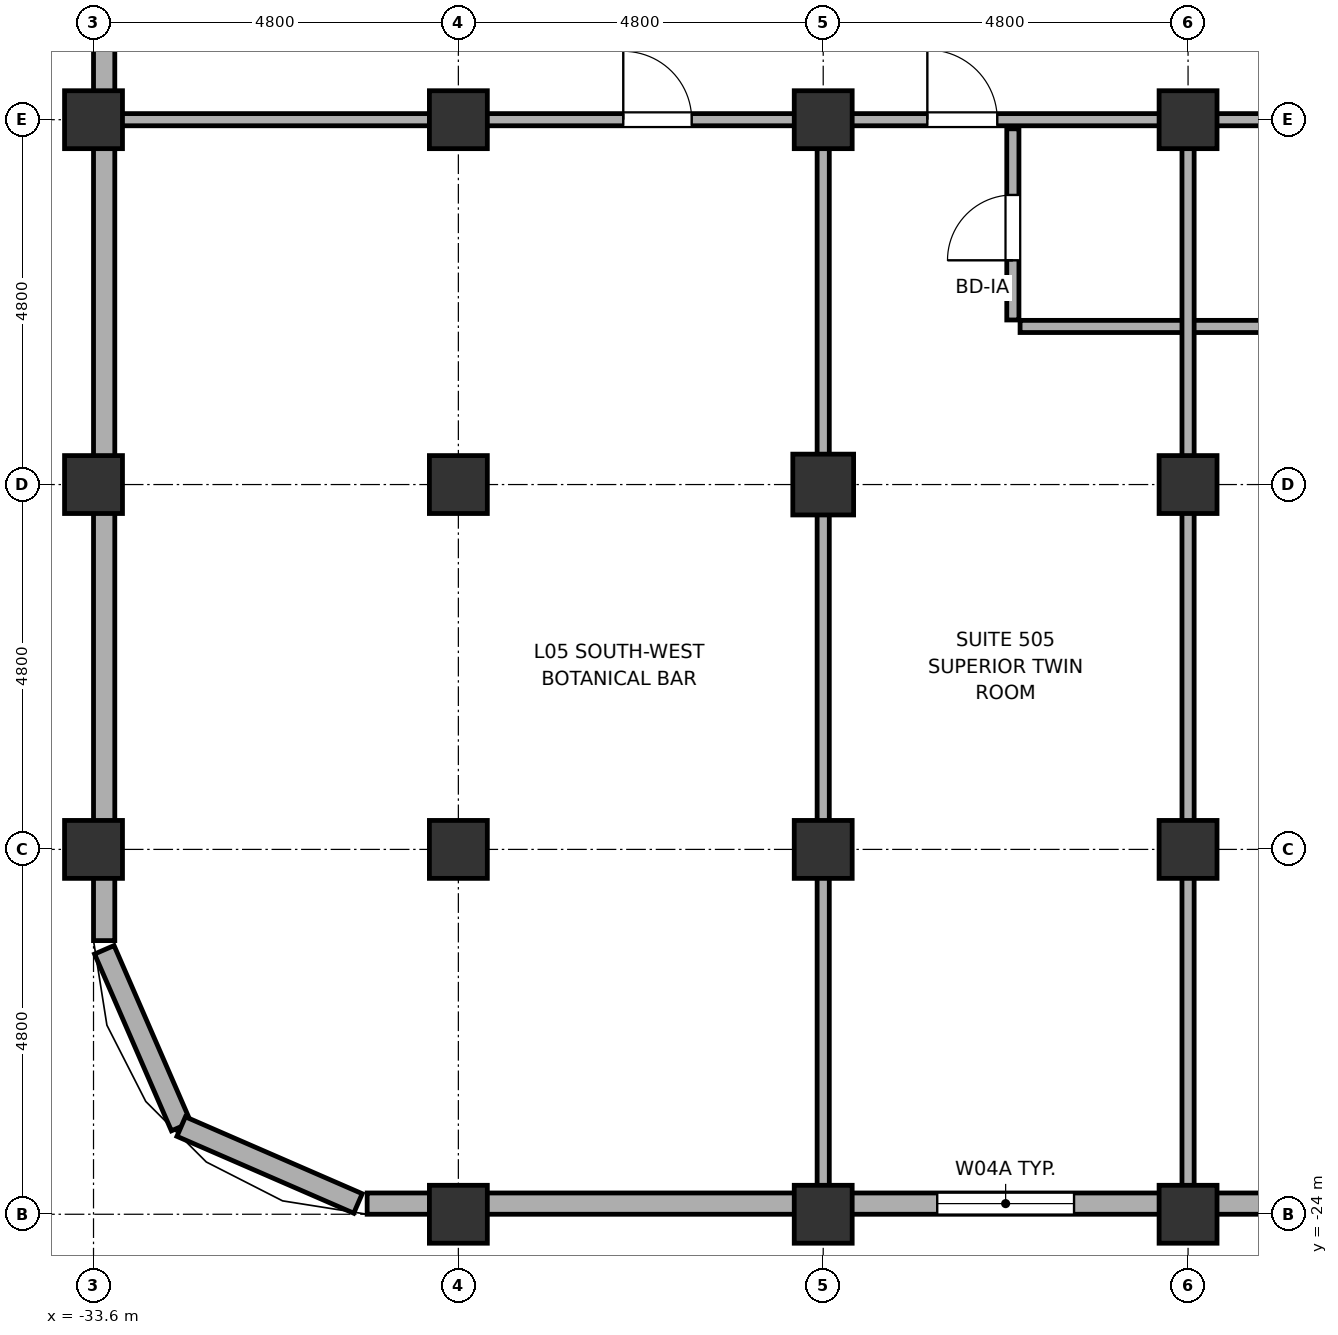
"""IFC4 building model, lengths in metres.
Left out: names, types, materials, properties, quantities, classifications, styles, units other than length and angle.
Written with IfcOpenShell. Run it as: python <this file> out.ifc"""

import sys

from ifc_helpers import new_model, si_unit, direction, frame, frame_2d, origin, origin_2d, place, context, subcontext, project, spatial, rectangle, hollow_rectangle, hollow_circle, extrude, element, fill, save


model = new_model("IFC4")
c1 = context("Model", 3, precision=1e-05, world=origin(), true_north=direction((0.0, 1.0)))
c2 = subcontext(c1, "Body", "Model", "MODEL_VIEW")
j1 = project(units=[si_unit("LENGTHUNIT", "METRE"), si_unit("PLANEANGLEUNIT", "RADIAN")], contexts=[c1])
p1 = place(None, origin())
s1 = spatial("IfcSite", under=j1, at=p1, CompositionType="ELEMENT")
p2 = place(p1, origin())
s2 = spatial("IfcBuilding", under=s1, at=p2, CompositionType="ELEMENT")
p3 = place(p2, frame((0.0, 0.0, 30.0)))
s3 = spatial("IfcBuildingStorey", under=s2, at=p3, CompositionType="ELEMENT", Elevation=30.0)
for number, where, z_axis, x_axis in (
    (1, (-33.6, -19.2, -0.18), (0.0, 0.0, 1.0), (1.0, 0.0, 0.0)),
    (2, (-33.6, -14.4, -0.18), (0.0, 0.0, 1.0), (1.0, 0.0, 0.0)),
    (3, (-33.6, -9.6, -0.18), (0.0, 0.0, 1.0), (1.0, 0.0, 0.0)),
):
    element("IfcColumn", number, at=place(p3, frame(where, z_axis=z_axis, x_axis=x_axis)), inside=s3, PredefinedType="COLUMN", context=c2, shape_type="SweptSolid", body=[
        extrude(hollow_circle(Radius=0.381, WallThickness=0.032, at=origin_2d()), origin(), (0.0, 0.0, 1.0), 3.88),
    ])
for number, where, z_axis, x_axis in (
    (4, (-28.8, -24.0, 0.0), (0.0, 0.0, 1.0), (1.0, 0.0, 0.0)),
    (5, (-28.8, -19.2, 0.0), (0.0, 0.0, 1.0), (1.0, 0.0, 0.0)),
    (6, (-28.8, -14.4, 0.0), (0.0, 0.0, 1.0), (1.0, 0.0, 0.0)),
    (7, (-28.8, -9.6, 0.0), (0.0, 0.0, 1.0), (1.0, 0.0, 0.0)),
    (8, (-24.0, -24.0, 0.0), (0.0, 0.0, 1.0), (1.0, 0.0, 0.0)),
    (9, (-24.0, -19.2, 0.0), (0.0, 0.0, 1.0), (1.0, 0.0, 0.0)),
):
    element("IfcColumn", number, at=place(p3, frame(where, z_axis=z_axis, x_axis=x_axis)), inside=s3, PredefinedType="COLUMN", context=c2, shape_type="SweptSolid", body=[
        extrude(hollow_circle(Radius=0.381, WallThickness=0.032, at=origin_2d()), origin(), (0.0, 0.0, 1.0), 3.7),
    ])
p4 = place(p3, frame((-24.0, -14.4, 0.0), z_axis=(0.0, 0.0, 1.0), x_axis=(1.0, 0.0, 0.0)))
e10 = element("IfcColumn", 10, at=p4, inside=s3, PredefinedType="COLUMN", context=c2, shape_type="SweptSolid", body=[
    extrude(hollow_rectangle(XDim=0.8, YDim=0.8, WallThickness=0.036, at=origin_2d()), origin(), (0.0, 0.0, 1.0), 3.7),
])
for number, where, z_axis, x_axis in (
    (11, (-24.0, -9.6, 0.0), (0.0, 0.0, 1.0), (1.0, 0.0, 0.0)),
    (12, (-19.2, -24.0, 0.0), (0.0, 0.0, 1.0), (1.0, 0.0, 0.0)),
    (13, (-19.2, -19.2, 0.0), (0.0, 0.0, 1.0), (1.0, 0.0, 0.0)),
    (14, (-19.2, -14.4, 0.0), (0.0, 0.0, 1.0), (1.0, 0.0, 0.0)),
    (15, (-19.2, -9.6, 0.0), (0.0, 0.0, 1.0), (1.0, 0.0, 0.0)),
):
    element("IfcColumn", number, at=place(p3, frame(where, z_axis=z_axis, x_axis=x_axis)), inside=s3, PredefinedType="COLUMN", context=c2, shape_type="SweptSolid", body=[
        extrude(hollow_circle(Radius=0.381, WallThickness=0.032, at=origin_2d()), origin(), (0.0, 0.0, 1.0), 3.7),
    ])
p5 = place(p3, frame((-33.458, -20.521, 0.0), z_axis=(0.0, 0.0, 1.0), x_axis=(0.398792985289, -0.917040977756, 0.0)))
e16 = element("IfcWall", 16, at=p5, inside=s3, PredefinedType="SOLIDWALL", context=c2, shape_type="SweptSolid", body=[
    extrude(rectangle(XDim=2.536, YDim=0.28, at=frame_2d((1.268, 0.0))), origin(), (0.0, 0.0, 1.0), 2.12),
])
p6 = place(p3, frame((-32.447, -22.847, 0.0), z_axis=(0.0, 0.0, 1.0), x_axis=(0.917060872934, -0.398747232384, 0.0)))
e17 = element("IfcWall", 17, at=p6, inside=s3, PredefinedType="SOLIDWALL", context=c2, shape_type="SweptSolid", body=[
    extrude(rectangle(XDim=2.536, YDim=0.28, at=frame_2d((1.268, 0.0))), origin(), (0.0, 0.0, 1.0), 2.12),
])
p7 = place(p3, frame((-30.0, -23.86, 0.0), z_axis=(0.0, 0.0, 1.0), x_axis=(1.0, 0.0, 0.0)))
e18 = element("IfcWall", 18, at=p7, inside=s3, PredefinedType="SOLIDWALL", context=c2, shape_type="SweptSolid", body=[
    extrude(rectangle(XDim=25.25, YDim=0.28, at=frame_2d((12.625, 0.0))), origin(), (0.0, 0.0, 1.0), 2.12),
])
p8 = place(p7, frame((7.5, 0.0, 0.75)))
e19 = element("IfcOpeningElement", 19, at=p8, cuts=e18, PredefinedType="OPENING", context=c2, shape_type="SweptSolid", body=[
    extrude(rectangle(XDim=1.8, YDim=1.15, at=frame_2d((0.9, 0.575))), frame((0.0, 0.155, 0.0), z_axis=(0.0, -1.0, 0.0), x_axis=(1.0, 0.0, 0.0)), (0.0, 0.0, 1.0), 0.31),
])
p9 = place(p7, frame((12.3, 0.0, 0.75)))
e20 = element("IfcOpeningElement", 20, at=p9, cuts=e18, PredefinedType="OPENING", context=c2, shape_type="SweptSolid", body=[
    extrude(rectangle(XDim=1.8, YDim=1.15, at=frame_2d((0.9, 0.575))), frame((0.0, 0.155, 0.0), z_axis=(0.0, -1.0, 0.0), x_axis=(1.0, 0.0, 0.0)), (0.0, 0.0, 1.0), 0.31),
])
p10 = place(p7, frame((17.1, 0.0, 0.75)))
e21 = element("IfcOpeningElement", 21, at=p10, cuts=e18, PredefinedType="OPENING", context=c2, shape_type="SweptSolid", body=[
    extrude(rectangle(XDim=1.8, YDim=1.15, at=frame_2d((0.9, 0.575))), frame((0.0, 0.155, 0.0), z_axis=(0.0, -1.0, 0.0), x_axis=(1.0, 0.0, 0.0)), (0.0, 0.0, 1.0), 0.31),
])
p11 = place(p7, frame((21.9, 0.0, 0.75)))
e22 = element("IfcOpeningElement", 22, at=p11, cuts=e18, PredefinedType="OPENING", context=c2, shape_type="SweptSolid", body=[
    extrude(rectangle(XDim=1.8, YDim=1.15, at=frame_2d((0.9, 0.575))), frame((0.0, 0.155, 0.0), z_axis=(0.0, -1.0, 0.0), x_axis=(1.0, 0.0, 0.0)), (0.0, 0.0, 1.0), 0.31),
])
p12 = place(p3, frame((-33.46, -20.4, 0.0), z_axis=(0.0, 0.0, 1.0), x_axis=(0.0, 1.0, 0.0)))
e23 = element("IfcWall", 23, at=p12, inside=s3, PredefinedType="SOLIDWALL", context=c2, shape_type="SweptSolid", body=[
    extrude(rectangle(XDim=20.38, YDim=0.28, at=frame_2d((10.19, 0.0))), origin(), (0.0, 0.0, 1.0), 2.12),
])
p13 = place(p12, frame((17.25, 0.0, 0.75)))
e24 = element("IfcOpeningElement", 24, at=p13, cuts=e23, PredefinedType="OPENING", context=c2, shape_type="SweptSolid", body=[
    extrude(rectangle(XDim=1.5, YDim=1.15, at=frame_2d((0.75, 0.575))), frame((0.0, 0.155, 0.0), z_axis=(0.0, -1.0, 0.0), x_axis=(1.0, 0.0, 0.0)), (0.0, 0.0, 1.0), 0.31),
])
p14 = place(p3, frame((-21.41, -12.32, 0.0), z_axis=(0.0, 0.0, 1.0), x_axis=(1.0, 0.0, 0.0)))
e25 = element("IfcWall", 25, at=p14, inside=s3, PredefinedType="PARTITIONING", context=c2, shape_type="SweptSolid", body=[
    extrude(rectangle(XDim=4.42, YDim=0.16, at=frame_2d((2.21, 0.0))), origin(), (0.0, 0.0, 1.0), 2.82),
])
p15 = place(p3, frame((-33.31, -9.6, 0.0), z_axis=(0.0, 0.0, 1.0), x_axis=(1.0, 0.0, 0.0)))
e26 = element("IfcWall", 26, at=p15, inside=s3, PredefinedType="PARTITIONING", context=c2, shape_type="SweptSolid", body=[
    extrude(rectangle(XDim=61.82, YDim=0.16, at=frame_2d((30.91, 0.0))), origin(), (0.0, 0.0, 1.0), 2.12),
])
p16 = place(p15, frame((6.679, 0.0, 0.0)))
e27 = element("IfcOpeningElement", 27, at=p16, cuts=e26, PredefinedType="OPENING", context=c2, shape_type="SweptSolid", body=[
    extrude(rectangle(XDim=0.9, YDim=2.02, at=frame_2d((0.45, 1.01))), frame((0.0, 0.095, 0.0), z_axis=(0.0, -1.0, 0.0), x_axis=(1.0, 0.0, 0.0)), (0.0, 0.0, 1.0), 0.19),
])
p17 = place(p15, frame((54.24, 0.0, 0.0)))
e28 = element("IfcOpeningElement", 28, at=p17, cuts=e26, PredefinedType="OPENING", context=c2, shape_type="SweptSolid", body=[
    extrude(rectangle(XDim=0.9, YDim=2.02, at=frame_2d((0.45, 1.01))), frame((0.0, 0.095, 0.0), z_axis=(0.0, -1.0, 0.0), x_axis=(1.0, 0.0, 0.0)), (0.0, 0.0, 1.0), 0.19),
])
p18 = place(p15, frame((10.68, 0.0, 0.0)))
e29 = element("IfcOpeningElement", 29, at=p18, cuts=e26, PredefinedType="OPENING", context=c2, shape_type="SweptSolid", body=[
    extrude(rectangle(XDim=0.92, YDim=2.02, at=frame_2d((0.46, 1.01))), frame((0.0, 0.095, 0.0), z_axis=(0.0, -1.0, 0.0), x_axis=(1.0, 0.0, 0.0)), (0.0, 0.0, 1.0), 0.19),
])
p19 = place(p15, frame((17.115, 0.0, 0.0)))
e30 = element("IfcOpeningElement", 30, at=p19, cuts=e26, PredefinedType="OPENING", context=c2, shape_type="SweptSolid", body=[
    extrude(rectangle(XDim=0.92, YDim=2.02, at=frame_2d((0.46, 1.01))), frame((0.0, 0.095, 0.0), z_axis=(0.0, -1.0, 0.0), x_axis=(1.0, 0.0, 0.0)), (0.0, 0.0, 1.0), 0.19),
])
p20 = place(p15, frame((19.785, 0.0, 0.0)))
e31 = element("IfcOpeningElement", 31, at=p20, cuts=e26, PredefinedType="OPENING", context=c2, shape_type="SweptSolid", body=[
    extrude(rectangle(XDim=0.92, YDim=2.02, at=frame_2d((0.46, 1.01))), frame((0.0, 0.095, 0.0), z_axis=(0.0, -1.0, 0.0), x_axis=(1.0, 0.0, 0.0)), (0.0, 0.0, 1.0), 0.19),
])
p21 = place(p15, frame((26.715, 0.0, 0.0)))
e32 = element("IfcOpeningElement", 32, at=p21, cuts=e26, PredefinedType="OPENING", context=c2, shape_type="SweptSolid", body=[
    extrude(rectangle(XDim=0.92, YDim=2.02, at=frame_2d((0.46, 1.01))), frame((0.0, 0.095, 0.0), z_axis=(0.0, -1.0, 0.0), x_axis=(1.0, 0.0, 0.0)), (0.0, 0.0, 1.0), 0.19),
])
p22 = place(p15, frame((29.385, 0.0, 0.0)))
e33 = element("IfcOpeningElement", 33, at=p22, cuts=e26, PredefinedType="OPENING", context=c2, shape_type="SweptSolid", body=[
    extrude(rectangle(XDim=0.92, YDim=2.02, at=frame_2d((0.46, 1.01))), frame((0.0, 0.095, 0.0), z_axis=(0.0, -1.0, 0.0), x_axis=(1.0, 0.0, 0.0)), (0.0, 0.0, 1.0), 0.19),
])
p23 = place(p15, frame((36.315, 0.0, 0.0)))
e34 = element("IfcOpeningElement", 34, at=p23, cuts=e26, PredefinedType="OPENING", context=c2, shape_type="SweptSolid", body=[
    extrude(rectangle(XDim=0.92, YDim=2.02, at=frame_2d((0.46, 1.01))), frame((0.0, 0.095, 0.0), z_axis=(0.0, -1.0, 0.0), x_axis=(1.0, 0.0, 0.0)), (0.0, 0.0, 1.0), 0.19),
])
p24 = place(p15, frame((38.985, 0.0, 0.0)))
e35 = element("IfcOpeningElement", 35, at=p24, cuts=e26, PredefinedType="OPENING", context=c2, shape_type="SweptSolid", body=[
    extrude(rectangle(XDim=0.92, YDim=2.02, at=frame_2d((0.46, 1.01))), frame((0.0, 0.095, 0.0), z_axis=(0.0, -1.0, 0.0), x_axis=(1.0, 0.0, 0.0)), (0.0, 0.0, 1.0), 0.19),
])
p25 = place(p15, frame((45.915, 0.0, 0.0)))
e36 = element("IfcOpeningElement", 36, at=p25, cuts=e26, PredefinedType="OPENING", context=c2, shape_type="SweptSolid", body=[
    extrude(rectangle(XDim=0.92, YDim=2.02, at=frame_2d((0.46, 1.01))), frame((0.0, 0.095, 0.0), z_axis=(0.0, -1.0, 0.0), x_axis=(1.0, 0.0, 0.0)), (0.0, 0.0, 1.0), 0.19),
])
p26 = place(p15, frame((48.585, 0.0, 0.0)))
e37 = element("IfcOpeningElement", 37, at=p26, cuts=e26, PredefinedType="OPENING", context=c2, shape_type="SweptSolid", body=[
    extrude(rectangle(XDim=0.92, YDim=2.02, at=frame_2d((0.46, 1.01))), frame((0.0, 0.095, 0.0), z_axis=(0.0, -1.0, 0.0), x_axis=(1.0, 0.0, 0.0)), (0.0, 0.0, 1.0), 0.19),
])
p27 = place(p3, frame((-24.0, -23.71, 0.0), z_axis=(0.0, 0.0, 1.0), x_axis=(0.0, 1.0, 0.0)))
e38 = element("IfcWall", 38, at=p27, inside=s3, PredefinedType="PARTITIONING", context=c2, shape_type="SweptSolid", body=[
    extrude(rectangle(XDim=13.99, YDim=0.16, at=frame_2d((6.995, 0.0))), origin(), (0.0, 0.0, 1.0), 2.12),
])
p28 = place(p3, frame((-21.505, -12.235, 0.0), z_axis=(0.0, 0.0, 1.0), x_axis=(0.0, 1.0, 0.0)))
e39 = element("IfcWall", 39, at=p28, inside=s3, PredefinedType="PARTITIONING", context=c2, shape_type="SweptSolid", body=[
    extrude(rectangle(XDim=2.515, YDim=0.16, at=frame_2d((1.258, 0.0))), origin(), (0.0, 0.0, 1.0), 2.12),
])
p29 = place(p28, frame((0.785, 0.0, 0.0)))
e40 = element("IfcOpeningElement", 40, at=p29, cuts=e39, PredefinedType="OPENING", context=c2, shape_type="SweptSolid", body=[
    extrude(rectangle(XDim=0.86, YDim=2.02, at=frame_2d((0.43, 1.01))), frame((0.0, 0.095, 0.0), z_axis=(0.0, -1.0, 0.0), x_axis=(1.0, 0.0, 0.0)), (0.0, 0.0, 1.0), 0.19),
])
p30 = place(p3, frame((-19.2, -23.71, 0.0), z_axis=(0.0, 0.0, 1.0), x_axis=(0.0, 1.0, 0.0)))
e41 = element("IfcWall", 41, at=p30, inside=s3, PredefinedType="PARTITIONING", context=c2, shape_type="SweptSolid", body=[
    extrude(rectangle(XDim=13.99, YDim=0.16, at=frame_2d((6.995, 0.0))), origin(), (0.0, 0.0, 1.0), 2.12),
])
p31 = place(p8, origin())
e42 = element("IfcWindow", 42, at=p31, inside=s3, PartitioningType="SINGLE_PANEL", PredefinedType="WINDOW", context=c2, shape_type="SweptSolid", body=[
    extrude(rectangle(XDim=1.8, YDim=1.15, at=frame_2d((0.9, 0.575))), frame((0.0, 0.03, 0.0), z_axis=(0.0, -1.0, 0.0), x_axis=(1.0, 0.0, 0.0)), (0.0, 0.0, 1.0), 0.06),
])
fill(e19, e42)
p32 = place(p16, origin())
e43 = element("IfcDoor", 43, at=p32, inside=s3, OperationType="SINGLE_SWING_RIGHT", PredefinedType="DOOR", context=c2, shape_type="SweptSolid", body=[
    extrude(rectangle(XDim=0.9, YDim=2.02, at=frame_2d((0.45, 1.01))), frame((0.0, 0.025, 0.0), z_axis=(0.0, -1.0, 0.0), x_axis=(1.0, 0.0, 0.0)), (0.0, 0.0, 1.0), 0.05),
])
fill(e27, e43)
p33 = place(p18, origin())
e44 = element("IfcDoor", 44, at=p33, inside=s3, OperationType="SINGLE_SWING_RIGHT", PredefinedType="DOOR", context=c2, shape_type="SweptSolid", body=[
    extrude(rectangle(XDim=0.92, YDim=2.02, at=frame_2d((0.46, 1.01))), frame((0.0, 0.025, 0.0), z_axis=(0.0, -1.0, 0.0), x_axis=(1.0, 0.0, 0.0)), (0.0, 0.0, 1.0), 0.05),
])
fill(e29, e44)
p34 = place(p29, origin())
e45 = element("IfcDoor", 45, at=p34, inside=s3, OperationType="SINGLE_SWING_RIGHT", PredefinedType="DOOR", context=c2, shape_type="SweptSolid", body=[
    extrude(rectangle(XDim=0.86, YDim=2.02, at=frame_2d((0.43, 1.01))), frame((0.0, 0.025, 0.0), z_axis=(0.0, -1.0, 0.0), x_axis=(1.0, 0.0, 0.0)), (0.0, 0.0, 1.0), 0.05),
])
fill(e40, e45)
save(model, sys.argv[1])
